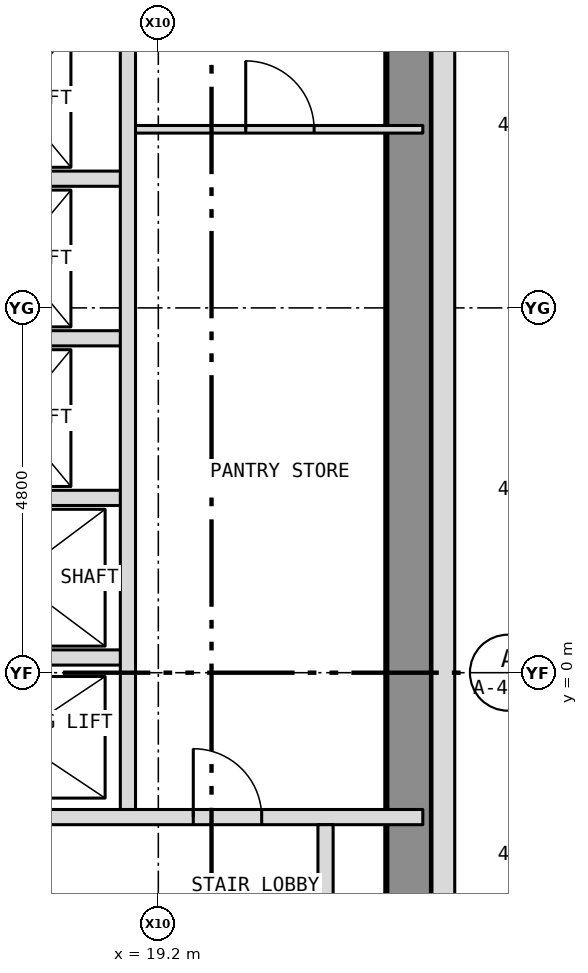
"""IFC4 building model, lengths in metres.
Left out: names, types, materials, properties, quantities, classifications, styles, units other than length and angle.
Written with IfcOpenShell. Run it as: python <this file> out.ifc"""

import sys

from ifc_helpers import new_model, si_unit, direction, frame, frame_2d, origin, place, context, subcontext, project, spatial, rectangle, extrude, element, fill, save


model = new_model("IFC4")
c1 = context("Model", 3, precision=1e-05, world=origin(), true_north=direction((0.0, 1.0)))
c2 = subcontext(c1, "Body", "Model", "MODEL_VIEW")
j1 = project(units=[si_unit("LENGTHUNIT", "METRE"), si_unit("PLANEANGLEUNIT", "RADIAN")], contexts=[c1])
p1 = place(None, origin())
s1 = spatial("IfcSite", under=j1, at=p1, CompositionType="ELEMENT")
p2 = place(p1, origin())
s2 = spatial("IfcBuilding", under=s1, at=p2, CompositionType="ELEMENT")
p3 = place(p2, frame((0.0, 0.0, 117.0)))
s3 = spatial("IfcBuildingStorey", under=s2, at=p3, CompositionType="ELEMENT", Elevation=117.0)
p4 = place(p3, frame((22.5, -10.8, 0.0), z_axis=(0.0, 0.0, 1.0), x_axis=(0.0, 1.0, 0.0)))
e1 = element("IfcWall", 1, at=p4, inside=s3, PredefinedType="SHEAR", context=c2, shape_type="SweptSolid", body=[
    extrude(rectangle(XDim=21.6, YDim=0.6, at=frame_2d((10.8, 0.0))), origin(), (0.0, 0.0, 1.0), 3.25),
])
p5 = place(p3, frame((22.95, -10.8, 0.0), z_axis=(0.0, 0.0, 1.0), x_axis=(0.0, 1.0, 0.0)))
e2 = element("IfcWall", 2, at=p5, inside=s3, PredefinedType="SOLIDWALL", context=c2, shape_type="SweptSolid", body=[
    extrude(rectangle(XDim=21.6, YDim=0.3, at=frame_2d((10.8, 0.0))), origin(), (0.0, 0.0, 1.0), 3.5),
])
p6 = place(p5, frame((2.95, 0.0, 1.0)))
e3 = element("IfcOpeningElement", 3, at=p6, cuts=e2, PredefinedType="OPENING", context=c2, shape_type="SweptSolid", body=[
    extrude(rectangle(XDim=0.6, YDim=1.5, at=frame_2d((0.3, 0.75))), frame((0.0, 0.162, 0.0), z_axis=(0.0, -1.0, 0.0), x_axis=(1.0, 0.0, 0.0)), (0.0, 0.0, 1.0), 0.324),
])
p7 = place(p3, frame((15.92, -1.9, 0.0), z_axis=(0.0, 0.0, 1.0), x_axis=(1.0, 0.0, 0.0)))
e4 = element("IfcWall", 4, at=p7, inside=s3, PredefinedType="PARTITIONING", context=c2, shape_type="SweptSolid", body=[
    extrude(rectangle(XDim=6.76, YDim=0.2, at=frame_2d((3.38, 0.0))), origin(), (0.0, 0.0, 1.0), 3.25),
])
p8 = place(p7, frame((3.74, 0.0, 0.0)))
e5 = element("IfcOpeningElement", 5, at=p8, cuts=e4, PredefinedType="OPENING", context=c2, shape_type="SweptSolid", body=[
    extrude(rectangle(XDim=0.9, YDim=2.1, at=frame_2d((0.45, 1.05))), frame((0.0, 0.112, 0.0), z_axis=(0.0, -1.0, 0.0), x_axis=(1.0, 0.0, 0.0)), (0.0, 0.0, 1.0), 0.224),
])
for number, where, z_axis, x_axis in (
    (6, (15.92, 0.2, 0.0), (0.0, 0.0, 1.0), (1.0, 0.0, 0.0)),
    (7, (15.92, 2.3, 0.0), (0.0, 0.0, 1.0), (1.0, 0.0, 0.0)),
    (8, (15.92, 4.4, 0.0), (0.0, 0.0, 1.0), (1.0, 0.0, 0.0)),
    (9, (15.92, 6.5, 0.0), (0.0, 0.0, 1.0), (1.0, 0.0, 0.0)),
):
    element("IfcWall", number, at=place(p3, frame(where, z_axis=z_axis, x_axis=x_axis)), inside=s3, PredefinedType="PARTITIONING", context=c2, shape_type="SweptSolid", body=[
        extrude(rectangle(XDim=2.88, YDim=0.2, at=frame_2d((1.44, 0.0))), origin(), (0.0, 0.0, 1.0), 3.25),
    ])
p9 = place(p3, frame((18.8, 7.15, 0.0), z_axis=(0.0, 0.0, 1.0), x_axis=(1.0, 0.0, 0.0)))
e10 = element("IfcWall", 10, at=p9, inside=s3, PredefinedType="PARTITIONING", context=c2, shape_type="SweptSolid", body=[
    extrude(rectangle(XDim=3.88, YDim=0.1, at=frame_2d((1.94, 0.0))), origin(), (0.0, 0.0, 1.0), 3.25),
])
p10 = place(p9, frame((1.55, 0.0, 0.0)))
e11 = element("IfcOpeningElement", 11, at=p10, cuts=e10, PredefinedType="OPENING", context=c2, shape_type="SweptSolid", body=[
    extrude(rectangle(XDim=0.9, YDim=2.1, at=frame_2d((0.45, 1.05))), frame((0.0, 0.062, 0.0), z_axis=(0.0, -1.0, 0.0), x_axis=(1.0, 0.0, 0.0)), (0.0, 0.0, 1.0), 0.124),
])
p11 = place(p3, frame((18.8, -1.8, 0.0), z_axis=(0.0, 0.0, 1.0), x_axis=(0.0, 1.0, 0.0)))
e12 = element("IfcWall", 12, at=p11, inside=s3, PredefinedType="PARTITIONING", context=c2, shape_type="SweptSolid", body=[
    extrude(rectangle(XDim=12.48, YDim=0.2, at=frame_2d((6.24, 0.0))), origin(), (0.0, 0.0, 1.0), 3.25),
])
p12 = place(p3, frame((21.4, -10.68, 0.0), z_axis=(0.0, 0.0, 1.0), x_axis=(0.0, 1.0, 0.0)))
e13 = element("IfcWall", 13, at=p12, inside=s3, PredefinedType="PARTITIONING", context=c2, shape_type="SweptSolid", body=[
    extrude(rectangle(XDim=8.68, YDim=0.2, at=frame_2d((4.34, 0.0))), origin(), (0.0, 0.0, 1.0), 3.25),
])
p13 = place(p12, frame((1.21, 0.0, 0.0)))
e14 = element("IfcOpeningElement", 14, at=p13, cuts=e13, PredefinedType="OPENING", context=c2, shape_type="SweptSolid", body=[
    extrude(rectangle(XDim=0.9, YDim=2.1, at=frame_2d((0.45, 1.05))), frame((0.0, 0.112, 0.0), z_axis=(0.0, -1.0, 0.0), x_axis=(1.0, 0.0, 0.0)), (0.0, 0.0, 1.0), 0.224),
])
p14 = place(p12, frame((5.66, 0.0, 0.0)))
e15 = element("IfcOpeningElement", 15, at=p14, cuts=e13, PredefinedType="OPENING", context=c2, shape_type="SweptSolid", body=[
    extrude(rectangle(XDim=0.9, YDim=2.1, at=frame_2d((0.45, 1.05))), frame((0.0, 0.112, 0.0), z_axis=(0.0, -1.0, 0.0), x_axis=(1.0, 0.0, 0.0)), (0.0, 0.0, 1.0), 0.224),
])
p15 = place(p8, origin())
e16 = element("IfcDoor", 16, at=p15, inside=s3, OperationType="SINGLE_SWING_LEFT", PredefinedType="DOOR", context=c2, shape_type="SweptSolid", body=[
    extrude(rectangle(XDim=0.9, YDim=2.1, at=frame_2d((0.45, 1.05))), frame((0.0, 0.025, 0.0), z_axis=(0.0, -1.0, 0.0), x_axis=(1.0, 0.0, 0.0)), (0.0, 0.0, 1.0), 0.05),
])
fill(e5, e16)
p16 = place(p10, origin())
e17 = element("IfcDoor", 17, at=p16, inside=s3, OperationType="SINGLE_SWING_LEFT", PredefinedType="DOOR", context=c2, shape_type="SweptSolid", body=[
    extrude(rectangle(XDim=0.9, YDim=2.1, at=frame_2d((0.45, 1.05))), frame((0.0, 0.025, 0.0), z_axis=(0.0, -1.0, 0.0), x_axis=(1.0, 0.0, 0.0)), (0.0, 0.0, 1.0), 0.05),
])
fill(e11, e17)
save(model, sys.argv[1])
